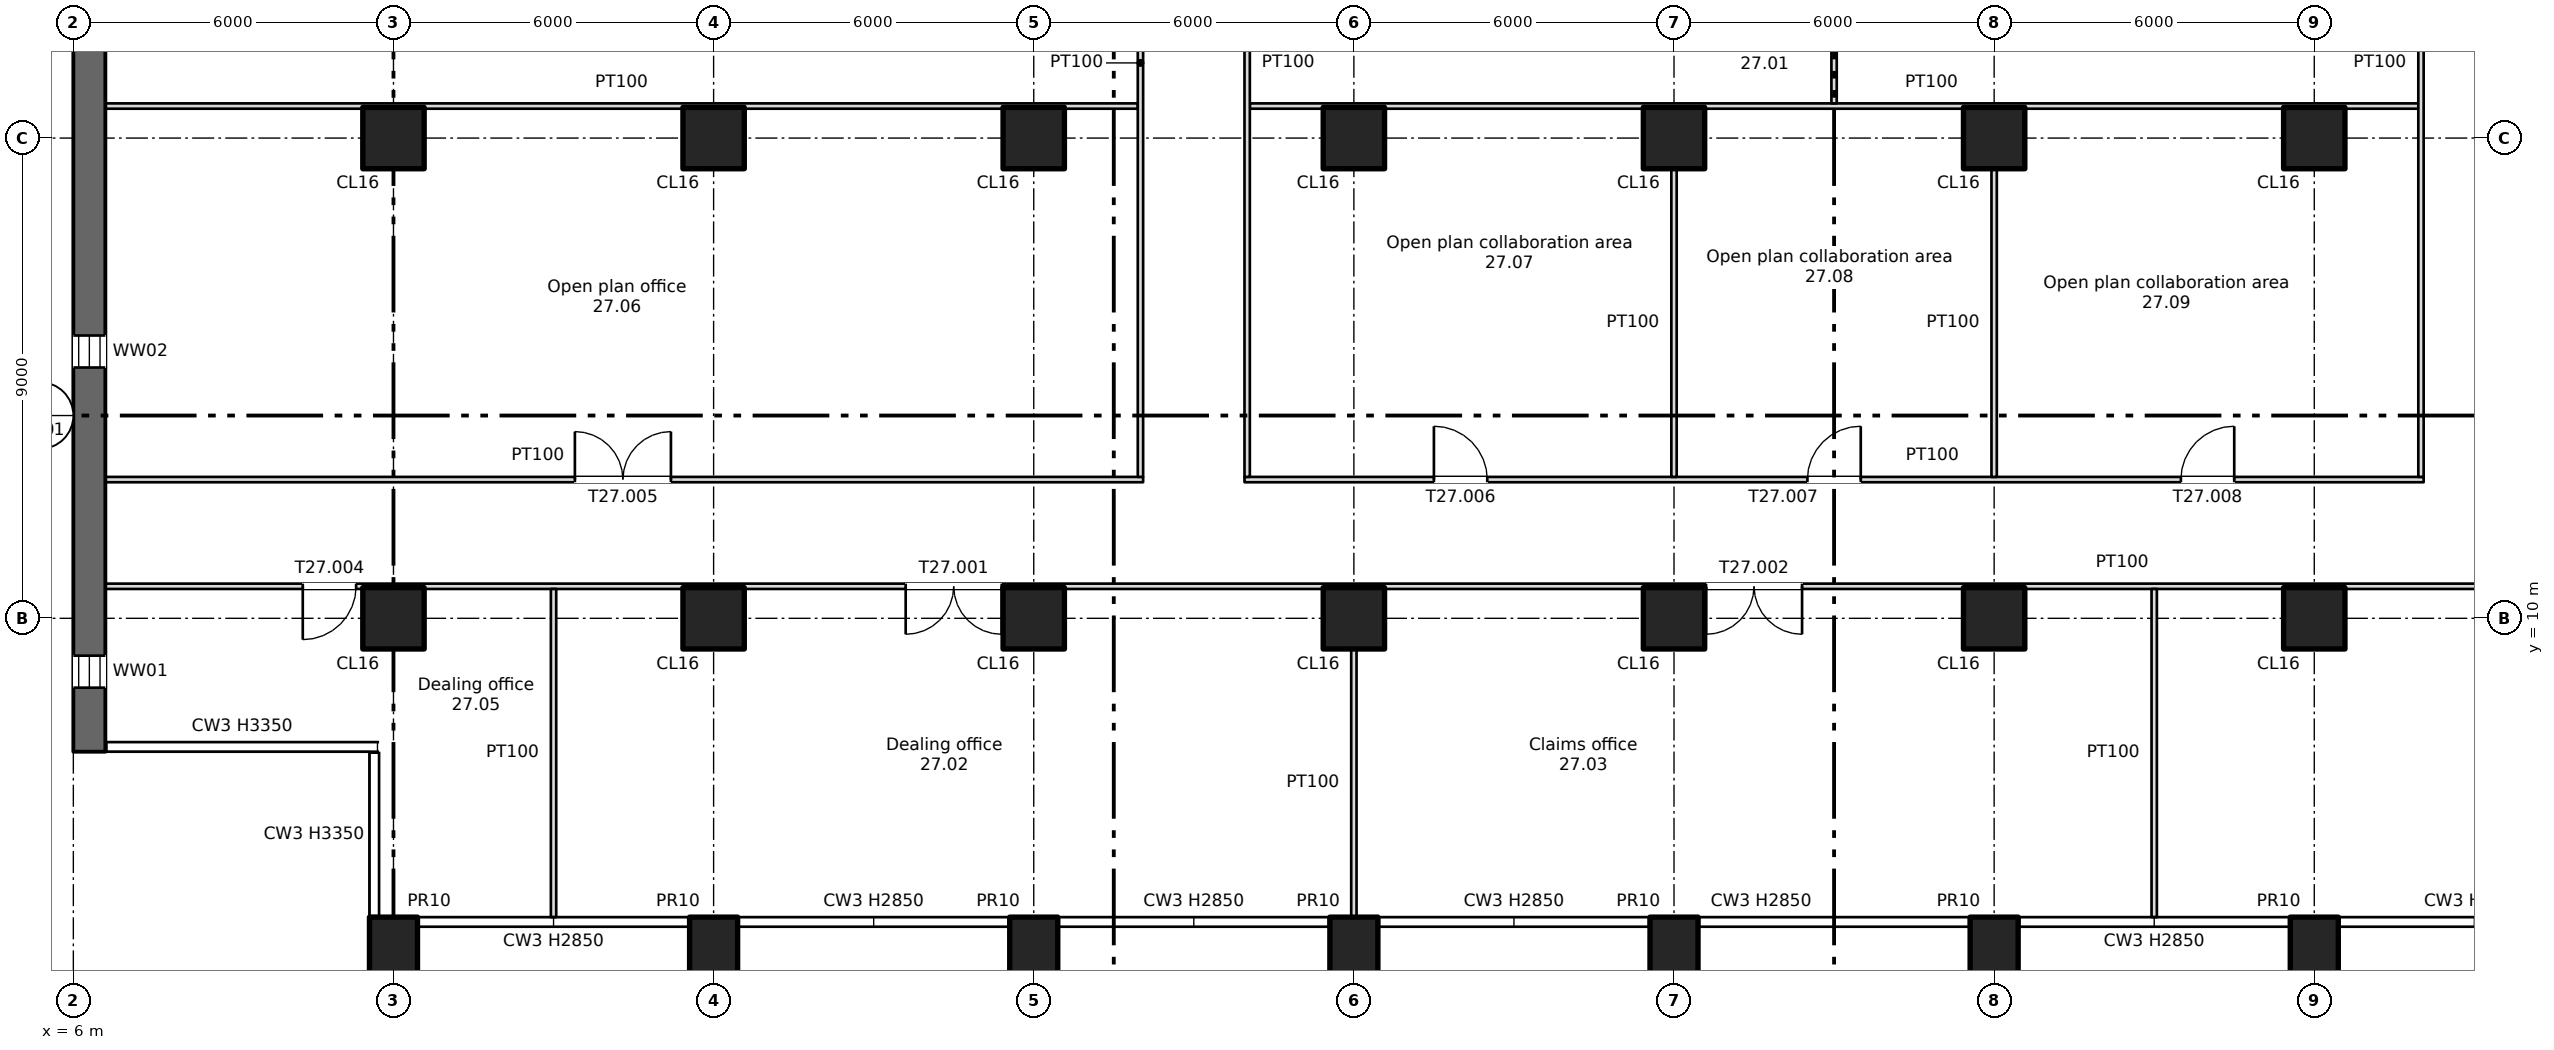
"""IFC4 building model, lengths in metres.
Left out: names, types, materials, properties, quantities, classifications, styles, units other than length and angle.
Written with IfcOpenShell. Run it as: python <this file> out.ifc"""

import sys

from ifc_helpers import new_model, si_unit, direction, frame, frame_2d, origin, origin_2d, place, context, subcontext, project, spatial, rectangle, extrude, element, fill, save


model = new_model("IFC4")
c1 = context("Model", 3, precision=1e-05, world=origin(), true_north=direction((0.0, 1.0)))
c2 = subcontext(c1, "Body", "Model", "MODEL_VIEW")
j1 = project(units=[si_unit("LENGTHUNIT", "METRE"), si_unit("PLANEANGLEUNIT", "RADIAN")], contexts=[c1])
p1 = place(None, origin())
s1 = spatial("IfcSite", under=j1, at=p1, CompositionType="ELEMENT")
p2 = place(p1, origin())
s2 = spatial("IfcBuilding", under=s1, at=p2, CompositionType="ELEMENT")
p3 = place(p2, frame((0.0, 0.0, 185.5)))
s3 = spatial("IfcBuildingStorey", under=s2, at=p3, CompositionType="ELEMENT", Elevation=185.5)
for number, where, z_axis, x_axis in (
    (1, (12.0, 3.7, -0.4), (0.0, 0.0, 1.0), (1.0, 0.0, 0.0)),
    (2, (18.0, 3.7, -0.4), (0.0, 0.0, 1.0), (1.0, 0.0, 0.0)),
    (3, (24.0, 3.7, -0.4), (0.0, 0.0, 1.0), (1.0, 0.0, 0.0)),
    (4, (30.0, 3.7, -0.4), (0.0, 0.0, 1.0), (1.0, 0.0, 0.0)),
    (5, (36.0, 3.7, -0.4), (0.0, 0.0, 1.0), (1.0, 0.0, 0.0)),
    (6, (42.0, 3.7, -0.4), (0.0, 0.0, 1.0), (1.0, 0.0, 0.0)),
    (7, (48.0, 3.7, -0.4), (0.0, 0.0, 1.0), (1.0, 0.0, 0.0)),
):
    element("IfcColumn", number, at=place(p3, frame(where, z_axis=z_axis, x_axis=x_axis)), inside=s3, PredefinedType="COLUMN", context=c2, shape_type="SweptSolid", body=[
        extrude(rectangle(XDim=0.9, YDim=1.4, at=origin_2d()), origin(), (0.0, 0.0, 1.0), 3.75),
    ])
for number, where, z_axis, x_axis in (
    (8, (12.0, 10.0, 0.0), (0.0, 0.0, 1.0), (1.0, 0.0, 0.0)),
    (9, (12.0, 19.0, 0.0), (0.0, 0.0, 1.0), (1.0, 0.0, 0.0)),
    (10, (18.0, 10.0, 0.0), (0.0, 0.0, 1.0), (1.0, 0.0, 0.0)),
    (11, (18.0, 19.0, 0.0), (0.0, 0.0, 1.0), (1.0, 0.0, 0.0)),
    (12, (24.0, 10.0, 0.0), (0.0, 0.0, 1.0), (1.0, 0.0, 0.0)),
    (13, (24.0, 19.0, 0.0), (0.0, 0.0, 1.0), (1.0, 0.0, 0.0)),
    (14, (30.0, 10.0, 0.0), (0.0, 0.0, 1.0), (1.0, 0.0, 0.0)),
    (15, (30.0, 19.0, 0.0), (0.0, 0.0, 1.0), (1.0, 0.0, 0.0)),
    (16, (36.0, 10.0, 0.0), (0.0, 0.0, 1.0), (1.0, 0.0, 0.0)),
    (17, (36.0, 19.0, 0.0), (0.0, 0.0, 1.0), (1.0, 0.0, 0.0)),
    (18, (42.0, 10.0, 0.0), (0.0, 0.0, 1.0), (1.0, 0.0, 0.0)),
    (19, (42.0, 19.0, 0.0), (0.0, 0.0, 1.0), (1.0, 0.0, 0.0)),
    (20, (48.0, 10.0, 0.0), (0.0, 0.0, 1.0), (1.0, 0.0, 0.0)),
    (21, (48.0, 19.0, 0.0), (0.0, 0.0, 1.0), (1.0, 0.0, 0.0)),
):
    element("IfcColumn", number, at=place(p3, frame(where, z_axis=z_axis, x_axis=x_axis)), inside=s3, PredefinedType="COLUMN", context=c2, shape_type="SweptSolid", body=[
        extrude(rectangle(XDim=1.15, YDim=1.15, at=origin_2d()), origin(), (0.0, 0.0, 1.0), 3.35),
    ])
p4 = place(p3, frame((6.3, 7.5, 0.0), z_axis=(0.0, 0.0, 1.0), x_axis=(0.0, 1.0, 0.0)))
e22 = element("IfcWall", 22, at=p4, inside=s3, PredefinedType="SHEAR", context=c2, shape_type="SweptSolid", body=[
    extrude(rectangle(XDim=34.0, YDim=0.6, at=frame_2d((17.0, 0.0))), origin(), (0.0, 0.0, 1.0), 3.35),
])
p5 = place(p4, frame((1.2, 0.0, 0.6)))
e23 = element("IfcOpeningElement", 23, at=p5, cuts=e22, PredefinedType="OPENING", context=c2, shape_type="SweptSolid", body=[
    extrude(rectangle(XDim=0.6, YDim=2.4, at=frame_2d((0.3, 1.2))), frame((0.0, 0.31, 0.0), z_axis=(0.0, -1.0, 0.0), x_axis=(1.0, 0.0, 0.0)), (0.0, 0.0, 1.0), 0.62),
])
p6 = place(p4, frame((7.2, 0.0, 0.6)))
e24 = element("IfcOpeningElement", 24, at=p6, cuts=e22, PredefinedType="OPENING", context=c2, shape_type="SweptSolid", body=[
    extrude(rectangle(XDim=0.6, YDim=2.4, at=frame_2d((0.3, 1.2))), frame((0.0, 0.31, 0.0), z_axis=(0.0, -1.0, 0.0), x_axis=(1.0, 0.0, 0.0)), (0.0, 0.0, 1.0), 0.62),
])
p7 = place(p4, frame((13.2, 0.0, 0.6)))
e25 = element("IfcOpeningElement", 25, at=p7, cuts=e22, PredefinedType="OPENING", context=c2, shape_type="SweptSolid", body=[
    extrude(rectangle(XDim=0.6, YDim=2.4, at=frame_2d((0.3, 1.2))), frame((0.0, 0.31, 0.0), z_axis=(0.0, -1.0, 0.0), x_axis=(1.0, 0.0, 0.0)), (0.0, 0.0, 1.0), 0.62),
])
p8 = place(p4, frame((19.2, 0.0, 0.6)))
e26 = element("IfcOpeningElement", 26, at=p8, cuts=e22, PredefinedType="OPENING", context=c2, shape_type="SweptSolid", body=[
    extrude(rectangle(XDim=0.6, YDim=2.4, at=frame_2d((0.3, 1.2))), frame((0.0, 0.31, 0.0), z_axis=(0.0, -1.0, 0.0), x_axis=(1.0, 0.0, 0.0)), (0.0, 0.0, 1.0), 0.62),
])
p9 = place(p3, frame((6.6, 10.6, 0.0), z_axis=(0.0, 0.0, 1.0), x_axis=(1.0, 0.0, 0.0)))
e27 = element("IfcWall", 27, at=p9, inside=s3, PredefinedType="PARTITIONING", context=c2, shape_type="SweptSolid", body=[
    extrude(rectangle(XDim=64.8, YDim=0.1, at=frame_2d((32.4, 0.0))), origin(), (0.0, 0.0, 1.0), 3.35),
])
p10 = place(p9, frame((15.0, 0.0, 0.0)))
e28 = element("IfcOpeningElement", 28, at=p10, cuts=e27, PredefinedType="OPENING", context=c2, shape_type="SweptSolid", body=[
    extrude(rectangle(XDim=1.8, YDim=2.1, at=frame_2d((0.9, 1.05))), frame((0.0, 0.06, 0.0), z_axis=(0.0, -1.0, 0.0), x_axis=(1.0, 0.0, 0.0)), (0.0, 0.0, 1.0), 0.12),
])
p11 = place(p9, frame((30.0, 0.0, 0.0)))
e29 = element("IfcOpeningElement", 29, at=p11, cuts=e27, PredefinedType="OPENING", context=c2, shape_type="SweptSolid", body=[
    extrude(rectangle(XDim=1.8, YDim=2.1, at=frame_2d((0.9, 1.05))), frame((0.0, 0.06, 0.0), z_axis=(0.0, -1.0, 0.0), x_axis=(1.0, 0.0, 0.0)), (0.0, 0.0, 1.0), 0.12),
])
p12 = place(p9, frame((50.7, 0.0, 0.0)))
e30 = element("IfcOpeningElement", 30, at=p12, cuts=e27, PredefinedType="OPENING", context=c2, shape_type="SweptSolid", body=[
    extrude(rectangle(XDim=1.8, YDim=2.1, at=frame_2d((0.9, 1.05))), frame((0.0, 0.06, 0.0), z_axis=(0.0, -1.0, 0.0), x_axis=(1.0, 0.0, 0.0)), (0.0, 0.0, 1.0), 0.12),
])
p13 = place(p9, frame((3.7, 0.0, 0.0)))
e31 = element("IfcOpeningElement", 31, at=p13, cuts=e27, PredefinedType="OPENING", context=c2, shape_type="SweptSolid", body=[
    extrude(rectangle(XDim=1.0, YDim=2.1, at=frame_2d((0.5, 1.05))), frame((0.0, 0.06, 0.0), z_axis=(0.0, -1.0, 0.0), x_axis=(1.0, 0.0, 0.0)), (0.0, 0.0, 1.0), 0.12),
])
p14 = place(p3, frame((6.6, 12.6, 0.0), z_axis=(0.0, 0.0, 1.0), x_axis=(1.0, 0.0, 0.0)))
e32 = element("IfcWall", 32, at=p14, inside=s3, PredefinedType="PARTITIONING", context=c2, shape_type="SweptSolid", body=[
    extrude(rectangle(XDim=19.45, YDim=0.1, at=frame_2d((9.725, 0.0))), origin(), (0.0, 0.0, 1.0), 3.35),
])
p15 = place(p14, frame((8.8, 0.0, 0.0)))
e33 = element("IfcOpeningElement", 33, at=p15, cuts=e32, PredefinedType="OPENING", context=c2, shape_type="SweptSolid", body=[
    extrude(rectangle(XDim=1.8, YDim=2.1, at=frame_2d((0.9, 1.05))), frame((0.0, 0.06, 0.0), z_axis=(0.0, -1.0, 0.0), x_axis=(1.0, 0.0, 0.0)), (0.0, 0.0, 1.0), 0.12),
])
p16 = place(p3, frame((27.95, 12.6, 0.0), z_axis=(0.0, 0.0, 1.0), x_axis=(1.0, 0.0, 0.0)))
e34 = element("IfcWall", 34, at=p16, inside=s3, PredefinedType="PARTITIONING", context=c2, shape_type="SweptSolid", body=[
    extrude(rectangle(XDim=22.1, YDim=0.1, at=frame_2d((11.05, 0.0))), origin(), (0.0, 0.0, 1.0), 3.35),
])
p17 = place(p16, frame((3.55, 0.0, 0.0)))
e35 = element("IfcOpeningElement", 35, at=p17, cuts=e34, PredefinedType="OPENING", context=c2, shape_type="SweptSolid", body=[
    extrude(rectangle(XDim=1.0, YDim=2.1, at=frame_2d((0.5, 1.05))), frame((0.0, 0.06, 0.0), z_axis=(0.0, -1.0, 0.0), x_axis=(1.0, 0.0, 0.0)), (0.0, 0.0, 1.0), 0.12),
])
p18 = place(p16, frame((10.55, 0.0, 0.0)))
e36 = element("IfcOpeningElement", 36, at=p18, cuts=e34, PredefinedType="OPENING", context=c2, shape_type="SweptSolid", body=[
    extrude(rectangle(XDim=1.0, YDim=2.1, at=frame_2d((0.5, 1.05))), frame((0.0, 0.06, 0.0), z_axis=(0.0, -1.0, 0.0), x_axis=(1.0, 0.0, 0.0)), (0.0, 0.0, 1.0), 0.12),
])
p19 = place(p16, frame((17.55, 0.0, 0.0)))
e37 = element("IfcOpeningElement", 37, at=p19, cuts=e34, PredefinedType="OPENING", context=c2, shape_type="SweptSolid", body=[
    extrude(rectangle(XDim=1.0, YDim=2.1, at=frame_2d((0.5, 1.05))), frame((0.0, 0.06, 0.0), z_axis=(0.0, -1.0, 0.0), x_axis=(1.0, 0.0, 0.0)), (0.0, 0.0, 1.0), 0.12),
])
p20 = place(p3, frame((6.6, 19.6, 0.0), z_axis=(0.0, 0.0, 1.0), x_axis=(1.0, 0.0, 0.0)))
e38 = element("IfcWall", 38, at=p20, inside=s3, PredefinedType="PARTITIONING", context=c2, shape_type="SweptSolid", body=[
    extrude(rectangle(XDim=19.35, YDim=0.1, at=frame_2d((9.675, 0.0))), origin(), (0.0, 0.0, 1.0), 3.35),
])
p21 = place(p3, frame((28.05, 19.6, 0.0), z_axis=(0.0, 0.0, 1.0), x_axis=(1.0, 0.0, 0.0)))
e39 = element("IfcWall", 39, at=p21, inside=s3, PredefinedType="PARTITIONING", context=c2, shape_type="SweptSolid", body=[
    extrude(rectangle(XDim=21.9, YDim=0.1, at=frame_2d((10.95, 0.0))), origin(), (0.0, 0.0, 1.0), 3.35),
])
p22 = place(p3, frame((15.0, 4.4, 0.0), z_axis=(0.0, 0.0, 1.0), x_axis=(0.0, 1.0, 0.0)))
e40 = element("IfcWall", 40, at=p22, inside=s3, PredefinedType="PARTITIONING", context=c2, shape_type="SweptSolid", body=[
    extrude(rectangle(XDim=6.15, YDim=0.1, at=frame_2d((3.075, 0.0))), origin(), (0.0, 0.0, 1.0), 3.35),
])
for number, where, z_axis, x_axis in (
    (41, (26.0, 12.65, 0.0), (0.0, 0.0, 1.0), (0.0, 1.0, 0.0)),
    (42, (28.0, 12.65, 0.0), (0.0, 0.0, 1.0), (0.0, 1.0, 0.0)),
):
    element("IfcWall", number, at=place(p3, frame(where, z_axis=z_axis, x_axis=x_axis)), inside=s3, PredefinedType="PARTITIONING", context=c2, shape_type="SweptSolid", body=[
        extrude(rectangle(XDim=13.3, YDim=0.1, at=frame_2d((6.65, 0.0))), origin(), (0.0, 0.0, 1.0), 3.35),
    ])
p23 = place(p3, frame((30.0, 4.4, 0.0), z_axis=(0.0, 0.0, 1.0), x_axis=(0.0, 1.0, 0.0)))
e43 = element("IfcWall", 43, at=p23, inside=s3, PredefinedType="PARTITIONING", context=c2, shape_type="SweptSolid", body=[
    extrude(rectangle(XDim=5.025, YDim=0.1, at=frame_2d((2.513, 0.0))), origin(), (0.0, 0.0, 1.0), 3.35),
])
p24 = place(p3, frame((36.0, 12.65, 0.0), z_axis=(0.0, 0.0, 1.0), x_axis=(0.0, 1.0, 0.0)))
e44 = element("IfcWall", 44, at=p24, inside=s3, PredefinedType="PARTITIONING", context=c2, shape_type="SweptSolid", body=[
    extrude(rectangle(XDim=5.775, YDim=0.1, at=frame_2d((2.888, 0.0))), origin(), (0.0, 0.0, 1.0), 3.35),
])
p25 = place(p3, frame((39.0, 19.65, 0.0), z_axis=(0.0, 0.0, 1.0), x_axis=(0.0, 1.0, 0.0)))
e45 = element("IfcWall", 45, at=p25, inside=s3, PredefinedType="PARTITIONING", context=c2, shape_type="SweptSolid", body=[
    extrude(rectangle(XDim=6.3, YDim=0.1, at=frame_2d((3.15, 0.0))), origin(), (0.0, 0.0, 1.0), 3.35),
])
p26 = place(p3, frame((42.0, 12.65, 0.0), z_axis=(0.0, 0.0, 1.0), x_axis=(0.0, 1.0, 0.0)))
e46 = element("IfcWall", 46, at=p26, inside=s3, PredefinedType="PARTITIONING", context=c2, shape_type="SweptSolid", body=[
    extrude(rectangle(XDim=5.775, YDim=0.1, at=frame_2d((2.888, 0.0))), origin(), (0.0, 0.0, 1.0), 3.35),
])
p27 = place(p3, frame((45.0, 4.4, 0.0), z_axis=(0.0, 0.0, 1.0), x_axis=(0.0, 1.0, 0.0)))
e47 = element("IfcWall", 47, at=p27, inside=s3, PredefinedType="PARTITIONING", context=c2, shape_type="SweptSolid", body=[
    extrude(rectangle(XDim=6.15, YDim=0.1, at=frame_2d((3.075, 0.0))), origin(), (0.0, 0.0, 1.0), 3.35),
])
p28 = place(p3, frame((50.0, 12.65, 0.0), z_axis=(0.0, 0.0, 1.0), x_axis=(0.0, 1.0, 0.0)))
e48 = element("IfcWall", 48, at=p28, inside=s3, PredefinedType="PARTITIONING", context=c2, shape_type="SweptSolid", body=[
    extrude(rectangle(XDim=13.3, YDim=0.1, at=frame_2d((6.65, 0.0))), origin(), (0.0, 0.0, 1.0), 3.35),
])
p29 = place(p5, origin())
e49 = element("IfcWindow", 49, at=p29, inside=s3, PartitioningType="SINGLE_PANEL", PredefinedType="WINDOW", context=c2, shape_type="SweptSolid", body=[
    extrude(rectangle(XDim=0.6, YDim=2.4, at=frame_2d((0.3, 1.2))), frame((0.0, 0.03, 0.0), z_axis=(0.0, -1.0, 0.0), x_axis=(1.0, 0.0, 0.0)), (0.0, 0.0, 1.0), 0.06),
])
fill(e23, e49)
p30 = place(p6, origin())
e50 = element("IfcWindow", 50, at=p30, inside=s3, PartitioningType="SINGLE_PANEL", PredefinedType="WINDOW", context=c2, shape_type="SweptSolid", body=[
    extrude(rectangle(XDim=0.6, YDim=2.4, at=frame_2d((0.3, 1.2))), frame((0.0, 0.03, 0.0), z_axis=(0.0, -1.0, 0.0), x_axis=(1.0, 0.0, 0.0)), (0.0, 0.0, 1.0), 0.06),
])
fill(e24, e50)
p31 = place(p10, origin())
e51 = element("IfcDoor", 51, at=p31, inside=s3, OperationType="DOUBLE_DOOR_SINGLE_SWING", PredefinedType="DOOR", context=c2, shape_type="SweptSolid", body=[
    extrude(rectangle(XDim=1.8, YDim=2.1, at=frame_2d((0.9, 1.05))), frame((0.0, 0.025, 0.0), z_axis=(0.0, -1.0, 0.0), x_axis=(1.0, 0.0, 0.0)), (0.0, 0.0, 1.0), 0.05),
])
fill(e28, e51)
p32 = place(p11, origin())
e52 = element("IfcDoor", 52, at=p32, inside=s3, OperationType="DOUBLE_DOOR_SINGLE_SWING", PredefinedType="DOOR", context=c2, shape_type="SweptSolid", body=[
    extrude(rectangle(XDim=1.8, YDim=2.1, at=frame_2d((0.9, 1.05))), frame((0.0, 0.025, 0.0), z_axis=(0.0, -1.0, 0.0), x_axis=(1.0, 0.0, 0.0)), (0.0, 0.0, 1.0), 0.05),
])
fill(e29, e52)
p33 = place(p13, origin())
e53 = element("IfcDoor", 53, at=p33, inside=s3, OperationType="SINGLE_SWING_LEFT", PredefinedType="DOOR", context=c2, shape_type="SweptSolid", body=[
    extrude(rectangle(XDim=1.0, YDim=2.1, at=frame_2d((0.5, 1.05))), frame((0.0, 0.025, 0.0), z_axis=(0.0, -1.0, 0.0), x_axis=(1.0, 0.0, 0.0)), (0.0, 0.0, 1.0), 0.05),
])
fill(e31, e53)
p34 = place(p15, origin())
e54 = element("IfcDoor", 54, at=p34, inside=s3, OperationType="DOUBLE_DOOR_SINGLE_SWING", PredefinedType="DOOR", context=c2, shape_type="SweptSolid", body=[
    extrude(rectangle(XDim=1.8, YDim=2.1, at=frame_2d((0.9, 1.05))), frame((0.0, 0.025, 0.0), z_axis=(0.0, -1.0, 0.0), x_axis=(1.0, 0.0, 0.0)), (0.0, 0.0, 1.0), 0.05),
])
fill(e33, e54)
p35 = place(p17, origin())
e55 = element("IfcDoor", 55, at=p35, inside=s3, OperationType="SINGLE_SWING_LEFT", PredefinedType="DOOR", context=c2, shape_type="SweptSolid", body=[
    extrude(rectangle(XDim=1.0, YDim=2.1, at=frame_2d((0.5, 1.05))), frame((0.0, 0.025, 0.0), z_axis=(0.0, -1.0, 0.0), x_axis=(1.0, 0.0, 0.0)), (0.0, 0.0, 1.0), 0.05),
])
fill(e35, e55)
p36 = place(p18, origin())
e56 = element("IfcDoor", 56, at=p36, inside=s3, OperationType="SINGLE_SWING_RIGHT", PredefinedType="DOOR", context=c2, shape_type="SweptSolid", body=[
    extrude(rectangle(XDim=1.0, YDim=2.1, at=frame_2d((0.5, 1.05))), frame((0.0, 0.025, 0.0), z_axis=(0.0, -1.0, 0.0), x_axis=(1.0, 0.0, 0.0)), (0.0, 0.0, 1.0), 0.05),
])
fill(e36, e56)
p37 = place(p19, origin())
e57 = element("IfcDoor", 57, at=p37, inside=s3, OperationType="SINGLE_SWING_RIGHT", PredefinedType="DOOR", context=c2, shape_type="SweptSolid", body=[
    extrude(rectangle(XDim=1.0, YDim=2.1, at=frame_2d((0.5, 1.05))), frame((0.0, 0.025, 0.0), z_axis=(0.0, -1.0, 0.0), x_axis=(1.0, 0.0, 0.0)), (0.0, 0.0, 1.0), 0.05),
])
fill(e37, e57)
save(model, sys.argv[1])
